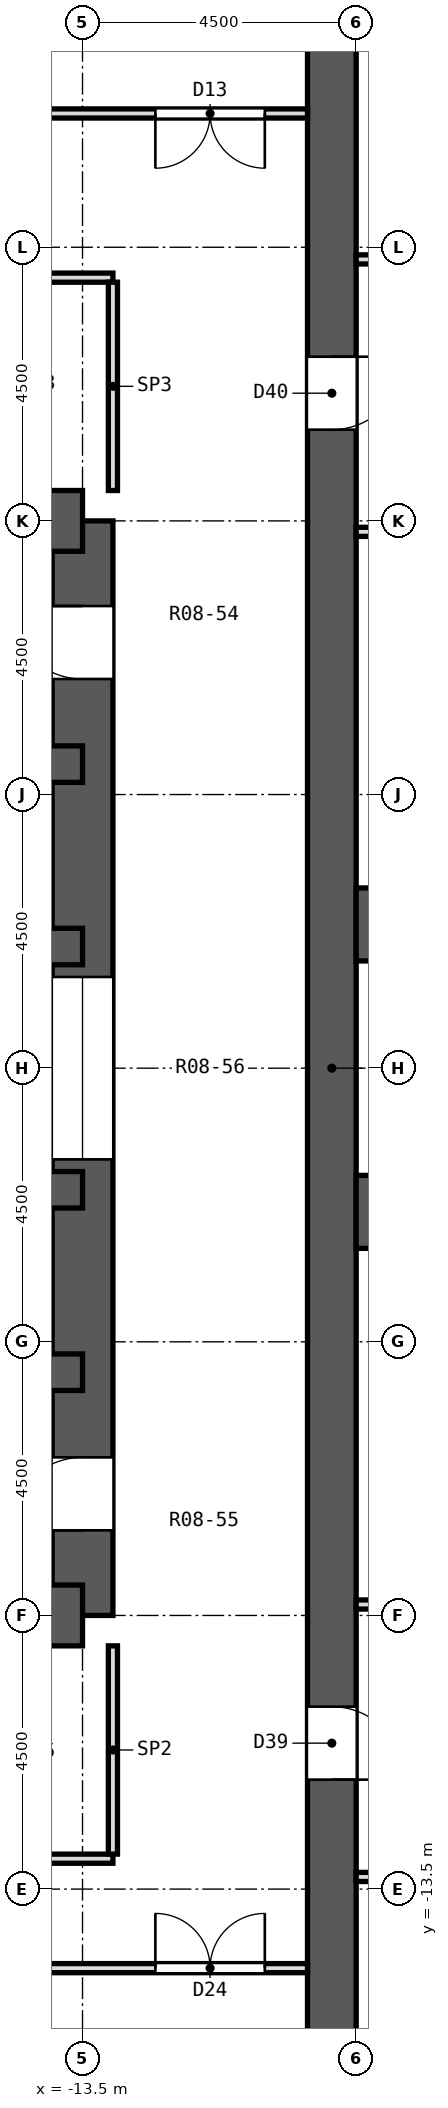
"""IFC4 building model, lengths in metres.
Left out: names, types, materials, properties, quantities, classifications, styles, units other than length and angle.
Written with IfcOpenShell. Run it as: python <this file> out.ifc"""

import sys

from ifc_helpers import new_model, si_unit, direction, frame, frame_2d, origin, place, context, subcontext, project, spatial, rectangle, extrude, element, fill, save


model = new_model("IFC4")
c1 = context("Model", 3, precision=1e-05, world=origin(), true_north=direction((0.0, 1.0)))
c2 = subcontext(c1, "Body", "Model", "MODEL_VIEW")
j1 = project(units=[si_unit("LENGTHUNIT", "METRE"), si_unit("PLANEANGLEUNIT", "RADIAN")], contexts=[c1])
p1 = place(None, origin())
s1 = spatial("IfcSite", under=j1, at=p1, CompositionType="ELEMENT")
p2 = place(p1, origin())
s2 = spatial("IfcBuilding", under=s1, at=p2, CompositionType="ELEMENT")
p3 = place(p2, frame((0.0, 0.0, 21.8)))
s3 = spatial("IfcBuildingStorey", under=s2, at=p3, CompositionType="ELEMENT", Elevation=21.8)
p4 = place(p3, frame((-13.5, -9.0, 0.0), z_axis=(0.0, 0.0, 1.0), x_axis=(0.0, 1.0, 0.0)))
e1 = element("IfcWall", 1, at=p4, inside=s3, PredefinedType="SHEAR", context=c2, shape_type="SweptSolid", body=[
    extrude(rectangle(XDim=18.0, YDim=1.0, at=frame_2d((9.0, 0.0))), origin(), (0.0, 0.0, 1.0), 4.5),
])
p5 = place(p4, frame((15.4, 0.0, 0.0)))
e2 = element("IfcOpeningElement", 2, at=p5, cuts=e1, PredefinedType="OPENING", context=c2, shape_type="SweptSolid", body=[
    extrude(rectangle(XDim=1.2, YDim=2.1, at=frame_2d((0.6, 1.05))), frame((0.0, 0.512, 0.0), z_axis=(0.0, -1.0, 0.0), x_axis=(1.0, 0.0, 0.0)), (0.0, 0.0, 1.0), 1.024),
])
p6 = place(p4, frame((1.4, 0.0, 0.0)))
e3 = element("IfcOpeningElement", 3, at=p6, cuts=e1, PredefinedType="OPENING", context=c2, shape_type="SweptSolid", body=[
    extrude(rectangle(XDim=1.2, YDim=2.1, at=frame_2d((0.6, 1.05))), frame((0.0, 0.512, 0.0), z_axis=(0.0, -1.0, 0.0), x_axis=(1.0, 0.0, 0.0)), (0.0, 0.0, 1.0), 1.024),
])
p7 = place(p4, frame((7.5, 0.0, 0.0)))
e4 = element("IfcOpeningElement", 4, at=p7, cuts=e1, PredefinedType="OPENING", context=c2, shape_type="SweptSolid", body=[
    extrude(rectangle(XDim=3.0, YDim=2.4, at=frame_2d((1.5, 1.2))), frame((0.0, 0.512, 0.0), z_axis=(0.0, -1.0, 0.0), x_axis=(1.0, 0.0, 0.0)), (0.0, 0.0, 1.0), 1.024),
])
for number, where, z_axis, x_axis in (
    (5, (-13.5, 9.0, 0.0), (0.0, 0.0, 1.0), (-1.0, 0.0, 0.0)),
    (6, (-13.5, -9.0, 0.0), (0.0, 0.0, 1.0), (-1.0, 0.0, 0.0)),
):
    element("IfcWall", number, at=place(p3, frame(where, z_axis=z_axis, x_axis=x_axis)), inside=s3, PredefinedType="SHEAR", context=c2, shape_type="SweptSolid", body=[
        extrude(rectangle(XDim=12.4, YDim=1.0, at=frame_2d((6.2, 0.0))), origin(), (0.0, 0.0, 1.0), 4.5),
    ])
p8 = place(p3, frame((-13.5, 5.0, 0.0), z_axis=(0.0, 0.0, 1.0), x_axis=(-1.0, 0.0, 0.0)))
e7 = element("IfcWall", 7, at=p8, inside=s3, PredefinedType="SHEAR", context=c2, shape_type="SweptSolid", body=[
    extrude(rectangle(XDim=12.4, YDim=0.6, at=frame_2d((6.2, 0.0))), origin(), (0.0, 0.0, 1.0), 4.5),
])
p9 = place(p8, frame((10.35, 0.0, 0.0)))
e8 = element("IfcOpeningElement", 8, at=p9, cuts=e7, PredefinedType="OPENING", context=c2, shape_type="SweptSolid", body=[
    extrude(rectangle(XDim=0.9, YDim=2.1, at=frame_2d((0.45, 1.05))), frame((0.0, 0.312, 0.0), z_axis=(0.0, -1.0, 0.0), x_axis=(1.0, 0.0, 0.0)), (0.0, 0.0, 1.0), 0.624),
])
p10 = place(p3, frame((-13.5, -5.0, 0.0), z_axis=(0.0, 0.0, 1.0), x_axis=(-1.0, 0.0, 0.0)))
e9 = element("IfcWall", 9, at=p10, inside=s3, PredefinedType="SHEAR", context=c2, shape_type="SweptSolid", body=[
    extrude(rectangle(XDim=12.4, YDim=0.6, at=frame_2d((6.2, 0.0))), origin(), (0.0, 0.0, 1.0), 4.5),
])
p11 = place(p10, frame((10.31, 0.0, 0.0)))
e10 = element("IfcOpeningElement", 10, at=p11, cuts=e9, PredefinedType="OPENING", context=c2, shape_type="SweptSolid", body=[
    extrude(rectangle(XDim=0.9, YDim=2.1, at=frame_2d((0.45, 1.05))), frame((0.0, 0.312, 0.0), z_axis=(0.0, -1.0, 0.0), x_axis=(1.0, 0.0, 0.0)), (0.0, 0.0, 1.0), 0.624),
])
p12 = place(p10, frame((0.6, 0.0, 0.0)))
e11 = element("IfcOpeningElement", 11, at=p12, cuts=e9, PredefinedType="OPENING", context=c2, shape_type="SweptSolid", body=[
    extrude(rectangle(XDim=1.1, YDim=2.1, at=frame_2d((0.55, 1.05))), frame((0.0, 0.312, 0.0), z_axis=(0.0, -1.0, 0.0), x_axis=(1.0, 0.0, 0.0)), (0.0, 0.0, 1.0), 0.624),
])
p13 = place(p3, frame((-13.5, 2.0, 0.0), z_axis=(0.0, 0.0, 1.0), x_axis=(-1.0, 0.0, 0.0)))
e12 = element("IfcWall", 12, at=p13, inside=s3, PredefinedType="SHEAR", context=c2, shape_type="SweptSolid", body=[
    extrude(rectangle(XDim=12.4, YDim=0.6, at=frame_2d((6.2, 0.0))), origin(), (0.0, 0.0, 1.0), 4.5),
])
p14 = place(p13, frame((7.65, 0.0, 0.0)))
e13 = element("IfcOpeningElement", 13, at=p14, cuts=e12, PredefinedType="OPENING", context=c2, shape_type="SweptSolid", body=[
    extrude(rectangle(XDim=1.1, YDim=2.1, at=frame_2d((0.55, 1.05))), frame((0.0, 0.312, 0.0), z_axis=(0.0, -1.0, 0.0), x_axis=(1.0, 0.0, 0.0)), (0.0, 0.0, 1.0), 0.624),
])
p15 = place(p13, frame((1.076, 0.0, 0.0)))
e14 = element("IfcOpeningElement", 14, at=p15, cuts=e12, PredefinedType="OPENING", context=c2, shape_type="SweptSolid", body=[
    extrude(rectangle(XDim=0.9, YDim=2.1, at=frame_2d((0.45, 1.05))), frame((0.0, 0.312, 0.0), z_axis=(0.0, -1.0, 0.0), x_axis=(1.0, 0.0, 0.0)), (0.0, 0.0, 1.0), 0.624),
])
p16 = place(p13, frame((3.196, 0.0, 0.0)))
e15 = element("IfcOpeningElement", 15, at=p16, cuts=e12, PredefinedType="OPENING", context=c2, shape_type="SweptSolid", body=[
    extrude(rectangle(XDim=0.9, YDim=2.1, at=frame_2d((0.45, 1.05))), frame((0.0, 0.312, 0.0), z_axis=(0.0, -1.0, 0.0), x_axis=(1.0, 0.0, 0.0)), (0.0, 0.0, 1.0), 0.624),
])
p17 = place(p13, frame((5.59, 0.0, 0.0)))
e16 = element("IfcOpeningElement", 16, at=p17, cuts=e12, PredefinedType="OPENING", context=c2, shape_type="SweptSolid", body=[
    extrude(rectangle(XDim=0.9, YDim=2.1, at=frame_2d((0.45, 1.05))), frame((0.0, 0.312, 0.0), z_axis=(0.0, -1.0, 0.0), x_axis=(1.0, 0.0, 0.0)), (0.0, 0.0, 1.0), 0.624),
])
p18 = place(p13, frame((10.31, 0.0, 0.0)))
e17 = element("IfcOpeningElement", 17, at=p18, cuts=e12, PredefinedType="OPENING", context=c2, shape_type="SweptSolid", body=[
    extrude(rectangle(XDim=0.9, YDim=2.1, at=frame_2d((0.45, 1.05))), frame((0.0, 0.312, 0.0), z_axis=(0.0, -1.0, 0.0), x_axis=(1.0, 0.0, 0.0)), (0.0, 0.0, 1.0), 0.624),
])
p19 = place(p3, frame((-13.5, -2.0, 0.0), z_axis=(0.0, 0.0, 1.0), x_axis=(-1.0, 0.0, 0.0)))
e18 = element("IfcWall", 18, at=p19, inside=s3, PredefinedType="SHEAR", context=c2, shape_type="SweptSolid", body=[
    extrude(rectangle(XDim=12.4, YDim=0.6, at=frame_2d((6.2, 0.0))), origin(), (0.0, 0.0, 1.0), 4.5),
])
p20 = place(p19, frame((5.62, 0.0, 0.0)))
e19 = element("IfcOpeningElement", 19, at=p20, cuts=e18, PredefinedType="OPENING", context=c2, shape_type="SweptSolid", body=[
    extrude(rectangle(XDim=1.1, YDim=2.1, at=frame_2d((0.55, 1.05))), frame((0.0, 0.312, 0.0), z_axis=(0.0, -1.0, 0.0), x_axis=(1.0, 0.0, 0.0)), (0.0, 0.0, 1.0), 0.624),
])
p21 = place(p19, frame((7.65, 0.0, 0.0)))
e20 = element("IfcOpeningElement", 20, at=p21, cuts=e18, PredefinedType="OPENING", context=c2, shape_type="SweptSolid", body=[
    extrude(rectangle(XDim=1.1, YDim=2.1, at=frame_2d((0.55, 1.05))), frame((0.0, 0.312, 0.0), z_axis=(0.0, -1.0, 0.0), x_axis=(1.0, 0.0, 0.0)), (0.0, 0.0, 1.0), 0.624),
])
p22 = place(p19, frame((1.265, 0.0, 0.0)))
e21 = element("IfcOpeningElement", 21, at=p22, cuts=e18, PredefinedType="OPENING", context=c2, shape_type="SweptSolid", body=[
    extrude(rectangle(XDim=1.0, YDim=2.1, at=frame_2d((0.5, 1.05))), frame((0.0, 0.312, 0.0), z_axis=(0.0, -1.0, 0.0), x_axis=(1.0, 0.0, 0.0)), (0.0, 0.0, 1.0), 0.624),
])
p23 = place(p19, frame((10.31, 0.0, 0.0)))
e22 = element("IfcOpeningElement", 22, at=p23, cuts=e18, PredefinedType="OPENING", context=c2, shape_type="SweptSolid", body=[
    extrude(rectangle(XDim=0.9, YDim=2.1, at=frame_2d((0.45, 1.05))), frame((0.0, 0.312, 0.0), z_axis=(0.0, -1.0, 0.0), x_axis=(1.0, 0.0, 0.0)), (0.0, 0.0, 1.0), 0.624),
])
p24 = place(p3, frame((-9.4, -27.077, 0.0), z_axis=(0.0, 0.0, 1.0), x_axis=(0.0, 1.0, 0.0)))
e23 = element("IfcWall", 23, at=p24, inside=s3, PredefinedType="SHEAR", context=c2, shape_type="SweptSolid", body=[
    extrude(rectangle(XDim=54.154, YDim=0.8, at=frame_2d((27.077, 0.0))), origin(), (0.0, 0.0, 1.0), 4.5),
])
p25 = place(p24, frame((15.377, 0.0, 0.0)))
e24 = element("IfcOpeningElement", 24, at=p25, cuts=e23, PredefinedType="OPENING", context=c2, shape_type="SweptSolid", body=[
    extrude(rectangle(XDim=1.2, YDim=2.1, at=frame_2d((0.6, 1.05))), frame((0.0, 0.412, 0.0), z_axis=(0.0, -1.0, 0.0), x_axis=(1.0, 0.0, 0.0)), (0.0, 0.0, 1.0), 0.824),
])
p26 = place(p24, frame((37.577, 0.0, 0.0)))
e25 = element("IfcOpeningElement", 25, at=p26, cuts=e23, PredefinedType="OPENING", context=c2, shape_type="SweptSolid", body=[
    extrude(rectangle(XDim=1.2, YDim=2.1, at=frame_2d((0.6, 1.05))), frame((0.0, 0.412, 0.0), z_axis=(0.0, -1.0, 0.0), x_axis=(1.0, 0.0, 0.0)), (0.0, 0.0, 1.0), 0.824),
])
for number, where, z_axis, x_axis in (
    (26, (-8.68, 1.764, 0.0), (0.0, 0.0, 1.0), (0.0, 1.0, 0.0)),
    (27, (-8.68, -2.964, 0.0), (0.0, 0.0, 1.0), (0.0, 1.0, 0.0)),
):
    element("IfcWall", number, at=place(p3, frame(where, z_axis=z_axis, x_axis=x_axis)), inside=s3, PredefinedType="SHEAR", context=c2, shape_type="SweptSolid", body=[
        extrude(rectangle(XDim=1.2, YDim=0.64, at=frame_2d((0.6, 0.0))), origin(), (0.0, 0.0, 1.0), 3.95),
    ])
p27 = place(p3, frame((-24.121, -14.8, 0.0), z_axis=(0.0, 0.0, 1.0), x_axis=(1.0, 0.0, 0.0)))
e28 = element("IfcWall", 28, at=p27, inside=s3, PredefinedType="PARTITIONING", context=c2, shape_type="SweptSolid", body=[
    extrude(rectangle(XDim=14.321, YDim=0.15, at=frame_2d((7.161, 0.0))), origin(), (0.0, 0.0, 1.0), 3.95),
])
p28 = place(p27, frame((5.653, 0.0, 0.0)))
e29 = element("IfcOpeningElement", 29, at=p28, cuts=e28, PredefinedType="OPENING", context=c2, shape_type="SweptSolid", body=[
    extrude(rectangle(XDim=1.0, YDim=2.1, at=frame_2d((0.5, 1.05))), frame((0.0, 0.087, 0.0), z_axis=(0.0, -1.0, 0.0), x_axis=(1.0, 0.0, 0.0)), (0.0, 0.0, 1.0), 0.174),
])
p29 = place(p27, frame((11.819, 0.0, 0.0)))
e30 = element("IfcOpeningElement", 30, at=p29, cuts=e28, PredefinedType="OPENING", context=c2, shape_type="SweptSolid", body=[
    extrude(rectangle(XDim=1.8, YDim=2.1, at=frame_2d((0.9, 1.05))), frame((0.0, 0.087, 0.0), z_axis=(0.0, -1.0, 0.0), x_axis=(1.0, 0.0, 0.0)), (0.0, 0.0, 1.0), 0.174),
])
p30 = place(p3, frame((-9.0, -13.3, 0.0), z_axis=(0.0, 0.0, 1.0), x_axis=(1.0, 0.0, 0.0)))
e31 = element("IfcWall", 31, at=p30, inside=s3, PredefinedType="PARTITIONING", context=c2, shape_type="SweptSolid", body=[
    extrude(rectangle(XDim=9.3, YDim=0.15, at=frame_2d((4.65, 0.0))), origin(), (0.0, 0.0, 1.0), 3.95),
])
p31 = place(p3, frame((-25.16, -13.0, 0.0), z_axis=(0.0, 0.0, 1.0), x_axis=(1.0, 0.0, 0.0)))
e32 = element("IfcWall", 32, at=p31, inside=s3, PredefinedType="PARTITIONING", context=c2, shape_type="SweptSolid", body=[
    extrude(rectangle(XDim=12.16, YDim=0.15, at=frame_2d((6.08, 0.0))), origin(), (0.0, 0.0, 1.0), 3.95),
])
p32 = place(p31, frame((1.055, 0.0, 0.0)))
e33 = element("IfcOpeningElement", 33, at=p32, cuts=e32, PredefinedType="OPENING", context=c2, shape_type="SweptSolid", body=[
    extrude(rectangle(XDim=0.9, YDim=2.1, at=frame_2d((0.45, 1.05))), frame((0.0, 0.087, 0.0), z_axis=(0.0, -1.0, 0.0), x_axis=(1.0, 0.0, 0.0)), (0.0, 0.0, 1.0), 0.174),
])
p33 = place(p31, frame((4.085, 0.0, 0.0)))
e34 = element("IfcOpeningElement", 34, at=p33, cuts=e32, PredefinedType="OPENING", context=c2, shape_type="SweptSolid", body=[
    extrude(rectangle(XDim=0.9, YDim=2.1, at=frame_2d((0.45, 1.05))), frame((0.0, 0.087, 0.0), z_axis=(0.0, -1.0, 0.0), x_axis=(1.0, 0.0, 0.0)), (0.0, 0.0, 1.0), 0.174),
])
p34 = place(p31, frame((7.135, 0.0, 0.0)))
e35 = element("IfcOpeningElement", 35, at=p34, cuts=e32, PredefinedType="OPENING", context=c2, shape_type="SweptSolid", body=[
    extrude(rectangle(XDim=0.9, YDim=2.1, at=frame_2d((0.45, 1.05))), frame((0.0, 0.087, 0.0), z_axis=(0.0, -1.0, 0.0), x_axis=(1.0, 0.0, 0.0)), (0.0, 0.0, 1.0), 0.174),
])
p35 = place(p31, frame((10.185, 0.0, 0.0)))
e36 = element("IfcOpeningElement", 36, at=p35, cuts=e32, PredefinedType="OPENING", context=c2, shape_type="SweptSolid", body=[
    extrude(rectangle(XDim=0.9, YDim=2.1, at=frame_2d((0.45, 1.05))), frame((0.0, 0.087, 0.0), z_axis=(0.0, -1.0, 0.0), x_axis=(1.0, 0.0, 0.0)), (0.0, 0.0, 1.0), 0.174),
])
for number, where, z_axis, x_axis in (
    (37, (-9.0, -8.82, 0.0), (0.0, 0.0, 1.0), (1.0, 0.0, 0.0)),
    (38, (-9.0, 8.82, 0.0), (0.0, 0.0, 1.0), (1.0, 0.0, 0.0)),
):
    element("IfcWall", number, at=place(p3, frame(where, z_axis=z_axis, x_axis=x_axis)), inside=s3, PredefinedType="PARTITIONING", context=c2, shape_type="SweptSolid", body=[
        extrude(rectangle(XDim=18.0, YDim=0.15, at=frame_2d((9.0, 0.0))), origin(), (0.0, 0.0, 1.0), 3.95),
    ])
p36 = place(p3, frame((-25.16, 13.0, 0.0), z_axis=(0.0, 0.0, 1.0), x_axis=(1.0, 0.0, 0.0)))
e39 = element("IfcWall", 39, at=p36, inside=s3, PredefinedType="PARTITIONING", context=c2, shape_type="SweptSolid", body=[
    extrude(rectangle(XDim=12.16, YDim=0.15, at=frame_2d((6.08, 0.0))), origin(), (0.0, 0.0, 1.0), 3.95),
])
p37 = place(p36, frame((10.185, 0.0, 0.0)))
e40 = element("IfcOpeningElement", 40, at=p37, cuts=e39, PredefinedType="OPENING", context=c2, shape_type="SweptSolid", body=[
    extrude(rectangle(XDim=0.9, YDim=2.1, at=frame_2d((0.45, 1.05))), frame((0.0, 0.087, 0.0), z_axis=(0.0, -1.0, 0.0), x_axis=(1.0, 0.0, 0.0)), (0.0, 0.0, 1.0), 0.174),
])
p38 = place(p36, frame((7.135, 0.0, 0.0)))
e41 = element("IfcOpeningElement", 41, at=p38, cuts=e39, PredefinedType="OPENING", context=c2, shape_type="SweptSolid", body=[
    extrude(rectangle(XDim=0.9, YDim=2.1, at=frame_2d((0.45, 1.05))), frame((0.0, 0.087, 0.0), z_axis=(0.0, -1.0, 0.0), x_axis=(1.0, 0.0, 0.0)), (0.0, 0.0, 1.0), 0.174),
])
p39 = place(p36, frame((4.085, 0.0, 0.0)))
e42 = element("IfcOpeningElement", 42, at=p39, cuts=e39, PredefinedType="OPENING", context=c2, shape_type="SweptSolid", body=[
    extrude(rectangle(XDim=0.9, YDim=2.1, at=frame_2d((0.45, 1.05))), frame((0.0, 0.087, 0.0), z_axis=(0.0, -1.0, 0.0), x_axis=(1.0, 0.0, 0.0)), (0.0, 0.0, 1.0), 0.174),
])
p40 = place(p36, frame((1.055, 0.0, 0.0)))
e43 = element("IfcOpeningElement", 43, at=p40, cuts=e39, PredefinedType="OPENING", context=c2, shape_type="SweptSolid", body=[
    extrude(rectangle(XDim=0.9, YDim=2.1, at=frame_2d((0.45, 1.05))), frame((0.0, 0.087, 0.0), z_axis=(0.0, -1.0, 0.0), x_axis=(1.0, 0.0, 0.0)), (0.0, 0.0, 1.0), 0.174),
])
p41 = place(p3, frame((-9.0, 13.3, 0.0), z_axis=(0.0, 0.0, 1.0), x_axis=(1.0, 0.0, 0.0)))
e44 = element("IfcWall", 44, at=p41, inside=s3, PredefinedType="PARTITIONING", context=c2, shape_type="SweptSolid", body=[
    extrude(rectangle(XDim=9.3, YDim=0.15, at=frame_2d((4.65, 0.0))), origin(), (0.0, 0.0, 1.0), 3.95),
])
p42 = place(p3, frame((-23.601, 15.7, 0.0), z_axis=(0.0, 0.0, 1.0), x_axis=(1.0, 0.0, 0.0)))
e45 = element("IfcWall", 45, at=p42, inside=s3, PredefinedType="PARTITIONING", context=c2, shape_type="SweptSolid", body=[
    extrude(rectangle(XDim=13.801, YDim=0.15, at=frame_2d((6.9, 0.0))), origin(), (0.0, 0.0, 1.0), 3.95),
])
p43 = place(p42, frame((11.299, 0.0, 0.0)))
e46 = element("IfcOpeningElement", 46, at=p43, cuts=e45, PredefinedType="OPENING", context=c2, shape_type="SweptSolid", body=[
    extrude(rectangle(XDim=1.8, YDim=2.1, at=frame_2d((0.9, 1.05))), frame((0.0, 0.087, 0.0), z_axis=(0.0, -1.0, 0.0), x_axis=(1.0, 0.0, 0.0)), (0.0, 0.0, 1.0), 0.174),
])
p44 = place(p42, frame((4.04, 0.0, 0.0)))
e47 = element("IfcOpeningElement", 47, at=p44, cuts=e45, PredefinedType="OPENING", context=c2, shape_type="SweptSolid", body=[
    extrude(rectangle(XDim=1.0, YDim=2.1, at=frame_2d((0.5, 1.05))), frame((0.0, 0.087, 0.0), z_axis=(0.0, -1.0, 0.0), x_axis=(1.0, 0.0, 0.0)), (0.0, 0.0, 1.0), 0.174),
])
for number, where, z_axis, x_axis in (
    (48, (-13.0, -12.925, 0.0), (0.0, 0.0, 1.0), (0.0, 1.0, 0.0)),
    (49, (-13.0, 9.5, 0.0), (0.0, 0.0, 1.0), (0.0, 1.0, 0.0)),
):
    element("IfcWall", number, at=place(p3, frame(where, z_axis=z_axis, x_axis=x_axis)), inside=s3, PredefinedType="PARTITIONING", context=c2, shape_type="SweptSolid", body=[
        extrude(rectangle(XDim=3.425, YDim=0.15, at=frame_2d((1.712, 0.0))), origin(), (0.0, 0.0, 1.0), 3.95),
    ])
p45 = place(p43, frame((1.8, 0.0, 0.0), z_axis=(0.0, 0.0, 1.0), x_axis=(-1.0, 0.0, 0.0)))
e50 = element("IfcDoor", 50, at=p45, inside=s3, OperationType="DOUBLE_DOOR_SINGLE_SWING", PredefinedType="DOOR", context=c2, shape_type="SweptSolid", body=[
    extrude(rectangle(XDim=1.8, YDim=2.1, at=frame_2d((0.9, 1.05))), frame((0.0, 0.025, 0.0), z_axis=(0.0, -1.0, 0.0), x_axis=(1.0, 0.0, 0.0)), (0.0, 0.0, 1.0), 0.05),
])
fill(e46, e50)
p46 = place(p29, origin())
e51 = element("IfcDoor", 51, at=p46, inside=s3, OperationType="DOUBLE_DOOR_SINGLE_SWING", PredefinedType="DOOR", context=c2, shape_type="SweptSolid", body=[
    extrude(rectangle(XDim=1.8, YDim=2.1, at=frame_2d((0.9, 1.05))), frame((0.0, 0.025, 0.0), z_axis=(0.0, -1.0, 0.0), x_axis=(1.0, 0.0, 0.0)), (0.0, 0.0, 1.0), 0.05),
])
fill(e30, e51)
p47 = place(p25, frame((1.2, 0.0, 0.0), z_axis=(0.0, 0.0, 1.0), x_axis=(-1.0, 0.0, 0.0)))
e52 = element("IfcDoor", 52, at=p47, inside=s3, OperationType="SINGLE_SWING_RIGHT", PredefinedType="DOOR", context=c2, shape_type="SweptSolid", body=[
    extrude(rectangle(XDim=1.2, YDim=2.1, at=frame_2d((0.6, 1.05))), frame((0.0, 0.025, 0.0), z_axis=(0.0, -1.0, 0.0), x_axis=(1.0, 0.0, 0.0)), (0.0, 0.0, 1.0), 0.05),
])
fill(e24, e52)
p48 = place(p26, frame((1.2, 0.0, 0.0), z_axis=(0.0, 0.0, 1.0), x_axis=(-1.0, 0.0, 0.0)))
e53 = element("IfcDoor", 53, at=p48, inside=s3, OperationType="SINGLE_SWING_LEFT", PredefinedType="DOOR", context=c2, shape_type="SweptSolid", body=[
    extrude(rectangle(XDim=1.2, YDim=2.1, at=frame_2d((0.6, 1.05))), frame((0.0, 0.025, 0.0), z_axis=(0.0, -1.0, 0.0), x_axis=(1.0, 0.0, 0.0)), (0.0, 0.0, 1.0), 0.05),
])
fill(e25, e53)
p49 = place(p5, origin())
e54 = element("IfcDoor", 54, at=p49, inside=s3, OperationType="SINGLE_SWING_RIGHT", PredefinedType="DOOR", context=c2, shape_type="SweptSolid", body=[
    extrude(rectangle(XDim=1.2, YDim=2.1, at=frame_2d((0.6, 1.05))), frame((0.0, 0.025, 0.0), z_axis=(0.0, -1.0, 0.0), x_axis=(1.0, 0.0, 0.0)), (0.0, 0.0, 1.0), 0.05),
])
fill(e2, e54)
p50 = place(p6, origin())
e55 = element("IfcDoor", 55, at=p50, inside=s3, OperationType="SINGLE_SWING_LEFT", PredefinedType="DOOR", context=c2, shape_type="SweptSolid", body=[
    extrude(rectangle(XDim=1.2, YDim=2.1, at=frame_2d((0.6, 1.05))), frame((0.0, 0.025, 0.0), z_axis=(0.0, -1.0, 0.0), x_axis=(1.0, 0.0, 0.0)), (0.0, 0.0, 1.0), 0.05),
])
fill(e3, e55)
p51 = place(p7, origin())
e56 = element("IfcDoor", 56, at=p51, inside=s3, OperationType="DOUBLE_DOOR_SLIDING", PredefinedType="DOOR", context=c2, shape_type="SweptSolid", body=[
    extrude(rectangle(XDim=3.0, YDim=2.4, at=frame_2d((1.5, 1.2))), frame((0.0, 0.025, 0.0), z_axis=(0.0, -1.0, 0.0), x_axis=(1.0, 0.0, 0.0)), (0.0, 0.0, 1.0), 0.05),
])
fill(e4, e56)
save(model, sys.argv[1])
